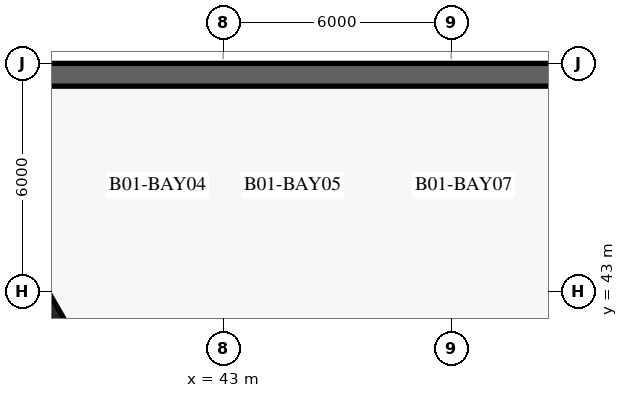
"""IFC4 building model, lengths in metres.
Left out: names, types, materials, properties, quantities, classifications, styles, units other than length and angle.
Written with IfcOpenShell. Run it as: python <this file> out.ifc"""

import sys

from ifc_helpers import new_model, si_unit, direction, frame, frame_2d, origin, origin_2d, place, context, subcontext, project, spatial, rectangle, i_section, extrude, element, save


model = new_model("IFC4")
c1 = context("Model", 3, precision=1e-05, world=origin(), true_north=direction((0.0, 1.0)))
c2 = subcontext(c1, "Body", "Model", "MODEL_VIEW")
j1 = project(units=[si_unit("LENGTHUNIT", "METRE"), si_unit("PLANEANGLEUNIT", "RADIAN")], contexts=[c1])
p1 = place(None, origin())
s1 = spatial("IfcSite", under=j1, at=p1, CompositionType="ELEMENT")
p2 = place(p1, origin())
s2 = spatial("IfcBuilding", under=s1, at=p2, CompositionType="ELEMENT")
p3 = place(p2, frame((0.0, 0.0, -4.2)))
s3 = spatial("IfcBuildingStorey", under=s2, at=p3, CompositionType="ELEMENT", Elevation=-4.2)
p4 = place(p3, frame((75.0, 48.7, 0.0), z_axis=(0.0, 0.0, 1.0), x_axis=(-1.0, 0.0, 0.0)))
e1 = element("IfcWall", 1, at=p4, inside=s3, PredefinedType="USERDEFINED", context=c2, shape_type="SweptSolid", body=[
    extrude(rectangle(XDim=74.0, YDim=0.6, at=frame_2d((37.0, 0.0))), origin(), (0.0, 0.0, 1.0), 3.88),
])
p5 = place(p3, frame((38.531, 42.464, 0.0), z_axis=(0.0, 0.0, 1.0), x_axis=(-0.5, 0.866025403784, 0.0)))
e2 = element("IfcColumn", 2, at=p5, inside=s3, PredefinedType="COLUMN", context=c2, shape_type="SweptSolid", body=[
    extrude(i_section(OverallWidth=0.302, OverallDepth=1.008, WebThickness=0.021, FlangeThickness=0.04, at=origin_2d()), origin(), (0.0, 0.0, 1.0), 4.2),
])
save(model, sys.argv[1])
